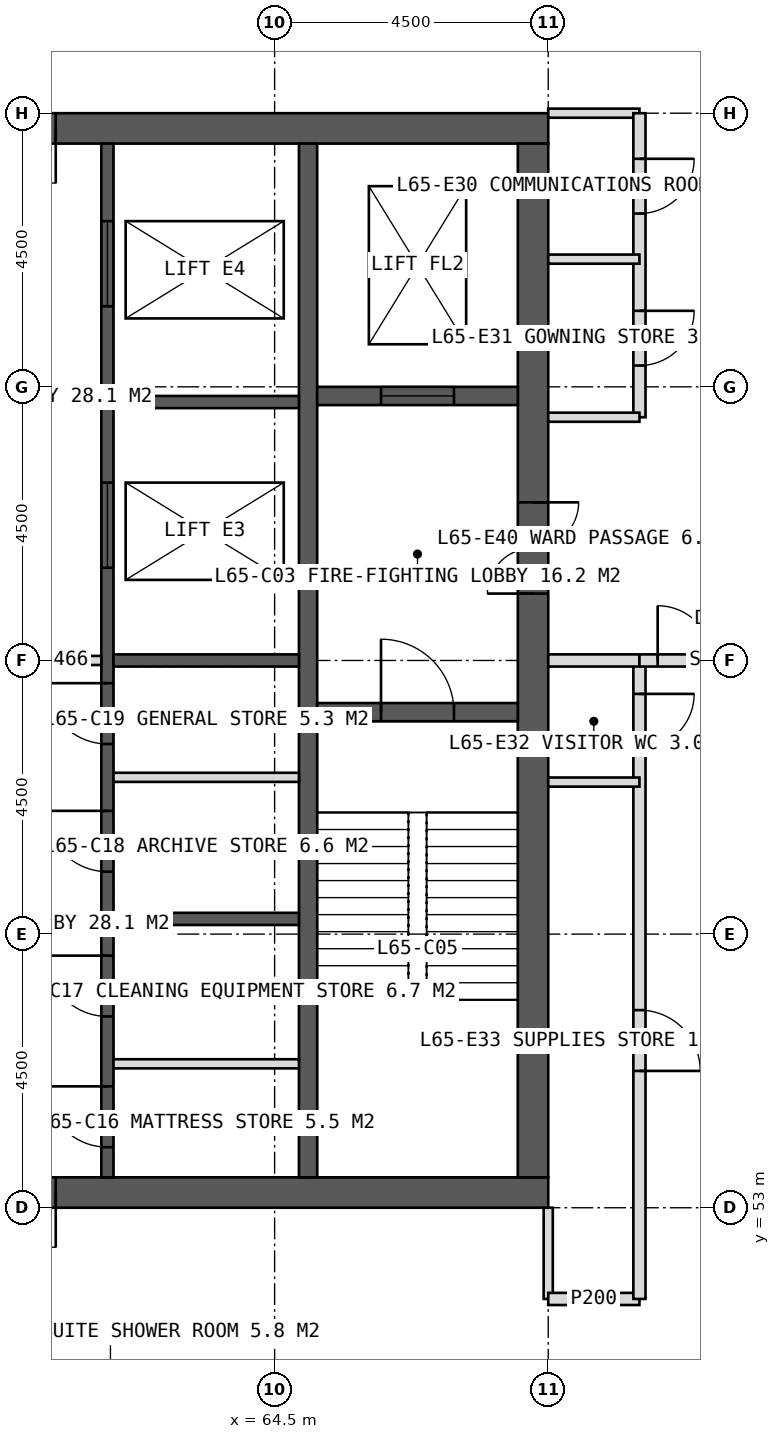
"""IFC4 building model, lengths in metres.
Left out: names, types, materials, properties, quantities, classifications, styles, units other than length and angle.
Written with IfcOpenShell. Run it as: python <this file> out.ifc"""

import sys

from ifc_helpers import new_model, si_unit, direction, frame, frame_2d, origin, place, context, subcontext, project, spatial, rectangle, extrude, element, fill, save


model = new_model("IFC4")
c1 = context("Model", 3, precision=1e-05, world=origin(), true_north=direction((0.0, 1.0)))
c2 = subcontext(c1, "Body", "Model", "MODEL_VIEW")
j1 = project(units=[si_unit("LENGTHUNIT", "METRE"), si_unit("PLANEANGLEUNIT", "RADIAN")], contexts=[c1])
p1 = place(None, origin())
s1 = spatial("IfcSite", under=j1, at=p1, CompositionType="ELEMENT")
p2 = place(p1, origin())
s2 = spatial("IfcBuilding", under=s1, at=p2, CompositionType="ELEMENT")
p3 = place(p2, frame((0.0, 0.0, 270.0)))
s3 = spatial("IfcBuildingStorey", under=s2, at=p3, CompositionType="ELEMENT", Elevation=270.0)
p4 = place(p3, frame((51.0, 70.75, 0.0), z_axis=(0.0, 0.0, 1.0), x_axis=(1.0, 0.0, 0.0)))
e1 = element("IfcWall", 1, at=p4, inside=s3, PredefinedType="SHEAR", context=c2, shape_type="SweptSolid", body=[
    extrude(rectangle(XDim=18.0, YDim=0.5, at=frame_2d((9.0, 0.0))), origin(), (0.0, 0.0, 1.0), 4.0),
])
p5 = place(p4, frame((8.1, 0.0, 0.0)))
e2 = element("IfcOpeningElement", 2, at=p5, cuts=e1, PredefinedType="OPENING", context=c2, shape_type="SweptSolid", body=[
    extrude(rectangle(XDim=1.8, YDim=2.2, at=frame_2d((0.9, 1.1))), frame((0.0, 0.26, 0.0), z_axis=(0.0, -1.0, 0.0), x_axis=(1.0, 0.0, 0.0)), (0.0, 0.0, 1.0), 0.52),
])
p6 = place(p3, frame((51.0, 53.25, 0.0), z_axis=(0.0, 0.0, 1.0), x_axis=(1.0, 0.0, 0.0)))
e3 = element("IfcWall", 3, at=p6, inside=s3, PredefinedType="SHEAR", context=c2, shape_type="SweptSolid", body=[
    extrude(rectangle(XDim=18.0, YDim=0.5, at=frame_2d((9.0, 0.0))), origin(), (0.0, 0.0, 1.0), 4.0),
])
p7 = place(p6, frame((8.1, 0.0, 0.0)))
e4 = element("IfcOpeningElement", 4, at=p7, cuts=e3, PredefinedType="OPENING", context=c2, shape_type="SweptSolid", body=[
    extrude(rectangle(XDim=1.8, YDim=2.2, at=frame_2d((0.9, 1.1))), frame((0.0, 0.26, 0.0), z_axis=(0.0, -1.0, 0.0), x_axis=(1.0, 0.0, 0.0)), (0.0, 0.0, 1.0), 0.52),
])
p8 = place(p3, frame((68.75, 53.5, 0.0), z_axis=(0.0, 0.0, 1.0), x_axis=(0.0, 1.0, 0.0)))
e5 = element("IfcWall", 5, at=p8, inside=s3, PredefinedType="SHEAR", context=c2, shape_type="SweptSolid", body=[
    extrude(rectangle(XDim=17.0, YDim=0.5, at=frame_2d((8.5, 0.0))), origin(), (0.0, 0.0, 1.0), 4.0),
])
p9 = place(p8, frame((9.6, 0.0, 0.0)))
e6 = element("IfcOpeningElement", 6, at=p9, cuts=e5, PredefinedType="OPENING", context=c2, shape_type="SweptSolid", body=[
    extrude(rectangle(XDim=1.5, YDim=2.2, at=frame_2d((0.75, 1.1))), frame((0.0, 0.26, 0.0), z_axis=(0.0, -1.0, 0.0), x_axis=(1.0, 0.0, 0.0)), (0.0, 0.0, 1.0), 0.52),
])
p10 = place(p3, frame((65.05, 53.5, 0.0), z_axis=(0.0, 0.0, 1.0), x_axis=(0.0, 1.0, 0.0)))
e7 = element("IfcWall", 7, at=p10, inside=s3, PredefinedType="SHEAR", context=c2, shape_type="SweptSolid", body=[
    extrude(rectangle(XDim=17.0, YDim=0.3, at=frame_2d((8.5, 0.0))), origin(), (0.0, 0.0, 1.0), 4.0),
])
p11 = place(p3, frame((61.75, 53.5, 0.0), z_axis=(0.0, 0.0, 1.0), x_axis=(0.0, 1.0, 0.0)))
e8 = element("IfcWall", 8, at=p11, inside=s3, PredefinedType="SHEAR", context=c2, shape_type="SweptSolid", body=[
    extrude(rectangle(XDim=17.0, YDim=0.2, at=frame_2d((8.5, 0.0))), origin(), (0.0, 0.0, 1.0), 4.0),
])
p12 = place(p11, frame((0.496, 0.0, 0.0)))
e9 = element("IfcOpeningElement", 9, at=p12, cuts=e8, PredefinedType="OPENING", context=c2, shape_type="SweptSolid", body=[
    extrude(rectangle(XDim=1.0, YDim=2.1, at=frame_2d((0.5, 1.05))), frame((0.0, 0.11, 0.0), z_axis=(0.0, -1.0, 0.0), x_axis=(1.0, 0.0, 0.0)), (0.0, 0.0, 1.0), 0.22),
])
p13 = place(p11, frame((2.646, 0.0, 0.0)))
e10 = element("IfcOpeningElement", 10, at=p13, cuts=e8, PredefinedType="OPENING", context=c2, shape_type="SweptSolid", body=[
    extrude(rectangle(XDim=1.0, YDim=2.1, at=frame_2d((0.5, 1.05))), frame((0.0, 0.11, 0.0), z_axis=(0.0, -1.0, 0.0), x_axis=(1.0, 0.0, 0.0)), (0.0, 0.0, 1.0), 0.22),
])
p14 = place(p11, frame((5.027, 0.0, 0.0)))
e11 = element("IfcOpeningElement", 11, at=p14, cuts=e8, PredefinedType="OPENING", context=c2, shape_type="SweptSolid", body=[
    extrude(rectangle(XDim=1.0, YDim=2.1, at=frame_2d((0.5, 1.05))), frame((0.0, 0.11, 0.0), z_axis=(0.0, -1.0, 0.0), x_axis=(1.0, 0.0, 0.0)), (0.0, 0.0, 1.0), 0.22),
])
p15 = place(p11, frame((7.126, 0.0, 0.0)))
e12 = element("IfcOpeningElement", 12, at=p15, cuts=e8, PredefinedType="OPENING", context=c2, shape_type="SweptSolid", body=[
    extrude(rectangle(XDim=1.0, YDim=2.1, at=frame_2d((0.5, 1.05))), frame((0.0, 0.11, 0.0), z_axis=(0.0, -1.0, 0.0), x_axis=(1.0, 0.0, 0.0)), (0.0, 0.0, 1.0), 0.22),
])
p16 = place(p11, frame((10.025, 0.0, 0.0)))
e13 = element("IfcOpeningElement", 13, at=p16, cuts=e8, PredefinedType="OPENING", context=c2, shape_type="SweptSolid", body=[
    extrude(rectangle(XDim=1.4, YDim=2.2, at=frame_2d((0.7, 1.1))), frame((0.0, 0.11, 0.0), z_axis=(0.0, -1.0, 0.0), x_axis=(1.0, 0.0, 0.0)), (0.0, 0.0, 1.0), 0.22),
])
p17 = place(p11, frame((14.325, 0.0, 0.0)))
e14 = element("IfcOpeningElement", 14, at=p17, cuts=e8, PredefinedType="OPENING", context=c2, shape_type="SweptSolid", body=[
    extrude(rectangle(XDim=1.4, YDim=2.2, at=frame_2d((0.7, 1.1))), frame((0.0, 0.11, 0.0), z_axis=(0.0, -1.0, 0.0), x_axis=(1.0, 0.0, 0.0)), (0.0, 0.0, 1.0), 0.22),
])
for number, where, z_axis, x_axis in (
    (15, (61.85, 57.75, 0.0), (0.0, 0.0, 1.0), (1.0, 0.0, 0.0)),
    (16, (61.85, 62.0, 0.0), (0.0, 0.0, 1.0), (1.0, 0.0, 0.0)),
    (17, (61.85, 66.25, 0.0), (0.0, 0.0, 1.0), (1.0, 0.0, 0.0)),
):
    element("IfcWall", number, at=place(p3, frame(where, z_axis=z_axis, x_axis=x_axis)), inside=s3, PredefinedType="SHEAR", context=c2, shape_type="SweptSolid", body=[
        extrude(rectangle(XDim=3.05, YDim=0.2, at=frame_2d((1.525, 0.0))), origin(), (0.0, 0.0, 1.0), 4.0),
    ])
p18 = place(p3, frame((65.2, 61.15, 0.0), z_axis=(0.0, 0.0, 1.0), x_axis=(1.0, 0.0, 0.0)))
e18 = element("IfcWall", 18, at=p18, inside=s3, PredefinedType="SHEAR", context=c2, shape_type="SweptSolid", body=[
    extrude(rectangle(XDim=3.3, YDim=0.3, at=frame_2d((1.65, 0.0))), origin(), (0.0, 0.0, 1.0), 4.0),
])
p19 = place(p18, frame((1.05, 0.0, 0.0)))
e19 = element("IfcOpeningElement", 19, at=p19, cuts=e18, PredefinedType="OPENING", context=c2, shape_type="SweptSolid", body=[
    extrude(rectangle(XDim=1.2, YDim=2.1, at=frame_2d((0.6, 1.05))), frame((0.0, 0.16, 0.0), z_axis=(0.0, -1.0, 0.0), x_axis=(1.0, 0.0, 0.0)), (0.0, 0.0, 1.0), 0.32),
])
p20 = place(p3, frame((65.2, 66.35, 0.0), z_axis=(0.0, 0.0, 1.0), x_axis=(1.0, 0.0, 0.0)))
e20 = element("IfcWall", 20, at=p20, inside=s3, PredefinedType="SHEAR", context=c2, shape_type="SweptSolid", body=[
    extrude(rectangle(XDim=3.3, YDim=0.3, at=frame_2d((1.65, 0.0))), origin(), (0.0, 0.0, 1.0), 4.0),
])
p21 = place(p20, frame((1.05, 0.0, 0.0)))
e21 = element("IfcOpeningElement", 21, at=p21, cuts=e20, PredefinedType="OPENING", context=c2, shape_type="SweptSolid", body=[
    extrude(rectangle(XDim=1.2, YDim=2.2, at=frame_2d((0.6, 1.1))), frame((0.0, 0.16, 0.0), z_axis=(0.0, -1.0, 0.0), x_axis=(1.0, 0.0, 0.0)), (0.0, 0.0, 1.0), 0.32),
])
p22 = place(p3, frame((69.0, 53.0, 0.0), z_axis=(0.0, 0.0, 1.0), x_axis=(0.0, -1.0, 0.0)))
e22 = element("IfcWall", 22, at=p22, inside=s3, PredefinedType="PARTITIONING", context=c2, shape_type="SweptSolid", body=[
    extrude(rectangle(XDim=1.5, YDim=0.15, at=frame_2d((0.75, 0.0))), origin(), (0.0, 0.0, 1.0), 3.75),
])
p23 = place(p3, frame((70.5, 51.5, 0.0), z_axis=(0.0, 0.0, 1.0), x_axis=(-1.0, 0.0, 0.0)))
e23 = element("IfcWall", 23, at=p23, inside=s3, PredefinedType="PARTITIONING", context=c2, shape_type="SweptSolid", body=[
    extrude(rectangle(XDim=1.5, YDim=0.2, at=frame_2d((0.75, 0.0))), origin(), (0.0, 0.0, 1.0), 3.75),
])
p24 = place(p3, frame((69.0, 71.0, 0.0), z_axis=(0.0, 0.0, 1.0), x_axis=(1.0, 0.0, 0.0)))
e24 = element("IfcWall", 24, at=p24, inside=s3, PredefinedType="PARTITIONING", context=c2, shape_type="SweptSolid", body=[
    extrude(rectangle(XDim=1.5, YDim=0.15, at=frame_2d((0.75, 0.0))), origin(), (0.0, 0.0, 1.0), 3.75),
])
p25 = place(p3, frame((70.5, 71.0, 0.0), z_axis=(0.0, 0.0, 1.0), x_axis=(0.0, -1.0, 0.0)))
e25 = element("IfcWall", 25, at=p25, inside=s3, PredefinedType="PARTITIONING", context=c2, shape_type="SweptSolid", body=[
    extrude(rectangle(XDim=5.0, YDim=0.2, at=frame_2d((2.5, 0.0))), origin(), (0.0, 0.0, 1.0), 3.75),
])
p26 = place(p25, frame((0.75, 0.0, 0.0)))
e26 = element("IfcOpeningElement", 26, at=p26, cuts=e25, PredefinedType="OPENING", context=c2, shape_type="SweptSolid", body=[
    extrude(rectangle(XDim=0.9, YDim=2.1, at=frame_2d((0.45, 1.05))), frame((0.0, 0.11, 0.0), z_axis=(0.0, -1.0, 0.0), x_axis=(1.0, 0.0, 0.0)), (0.0, 0.0, 1.0), 0.22),
])
p27 = place(p25, frame((3.25, 0.0, 0.0)))
e27 = element("IfcOpeningElement", 27, at=p27, cuts=e25, PredefinedType="OPENING", context=c2, shape_type="SweptSolid", body=[
    extrude(rectangle(XDim=0.9, YDim=2.1, at=frame_2d((0.45, 1.05))), frame((0.0, 0.11, 0.0), z_axis=(0.0, -1.0, 0.0), x_axis=(1.0, 0.0, 0.0)), (0.0, 0.0, 1.0), 0.22),
])
p28 = place(p3, frame((70.5, 62.0, 0.0), z_axis=(0.0, 0.0, 1.0), x_axis=(0.0, -1.0, 0.0)))
e28 = element("IfcWall", 28, at=p28, inside=s3, PredefinedType="PARTITIONING", context=c2, shape_type="SweptSolid", body=[
    extrude(rectangle(XDim=10.5, YDim=0.2, at=frame_2d((5.25, 0.0))), origin(), (0.0, 0.0, 1.0), 3.75),
])
p29 = place(p28, frame((0.55, 0.0, 0.0)))
e29 = element("IfcOpeningElement", 29, at=p29, cuts=e28, PredefinedType="OPENING", context=c2, shape_type="SweptSolid", body=[
    extrude(rectangle(XDim=0.9, YDim=2.1, at=frame_2d((0.45, 1.05))), frame((0.0, 0.11, 0.0), z_axis=(0.0, -1.0, 0.0), x_axis=(1.0, 0.0, 0.0)), (0.0, 0.0, 1.0), 0.22),
])
p30 = place(p28, frame((5.75, 0.0, 0.0)))
e30 = element("IfcOpeningElement", 30, at=p30, cuts=e28, PredefinedType="OPENING", context=c2, shape_type="SweptSolid", body=[
    extrude(rectangle(XDim=1.0, YDim=2.1, at=frame_2d((0.5, 1.05))), frame((0.0, 0.11, 0.0), z_axis=(0.0, -1.0, 0.0), x_axis=(1.0, 0.0, 0.0)), (0.0, 0.0, 1.0), 0.22),
])
p31 = place(p3, frame((69.0, 66.0, 0.0), z_axis=(0.0, 0.0, 1.0), x_axis=(1.0, 0.0, 0.0)))
e31 = element("IfcWall", 31, at=p31, inside=s3, PredefinedType="PARTITIONING", context=c2, shape_type="SweptSolid", body=[
    extrude(rectangle(XDim=1.5, YDim=0.15, at=frame_2d((0.75, 0.0))), origin(), (0.0, 0.0, 1.0), 3.75),
])
p32 = place(p3, frame((69.0, 62.0, 0.0), z_axis=(0.0, 0.0, 1.0), x_axis=(1.0, 0.0, 0.0)))
e32 = element("IfcWall", 32, at=p32, inside=s3, PredefinedType="SOLIDWALL", context=c2, shape_type="SweptSolid", body=[
    extrude(rectangle(XDim=1.5, YDim=0.2, at=frame_2d((0.75, 0.0))), origin(), (0.0, 0.0, 1.0), 2.75),
])
for number, where, z_axis, x_axis in (
    (33, (69.0, 68.6, 0.0), (0.0, 0.0, 1.0), (1.0, 0.0, 0.0)),
    (34, (69.0, 60.0, 0.0), (0.0, 0.0, 1.0), (1.0, 0.0, 0.0)),
):
    element("IfcWall", number, at=place(p3, frame(where, z_axis=z_axis, x_axis=x_axis)), inside=s3, PredefinedType="PARTITIONING", context=c2, shape_type="SweptSolid", body=[
        extrude(rectangle(XDim=1.5, YDim=0.15, at=frame_2d((0.75, 0.0))), origin(), (0.0, 0.0, 1.0), 3.75),
    ])
p33 = place(p3, frame((70.5, 62.0, 0.0), z_axis=(0.0, 0.0, 1.0), x_axis=(1.0, 0.0, 0.0)))
e35 = element("IfcWall", 35, at=p33, inside=s3, PredefinedType="SOLIDWALL", context=c2, shape_type="SweptSolid", body=[
    extrude(rectangle(XDim=2.6, YDim=0.2, at=frame_2d((1.3, 0.0))), origin(), (0.0, 0.0, 1.0), 2.75),
])
p34 = place(p33, frame((0.3, 0.0, 0.0)))
e36 = element("IfcOpeningElement", 36, at=p34, cuts=e35, PredefinedType="OPENING", context=c2, shape_type="SweptSolid", body=[
    extrude(rectangle(XDim=1.8, YDim=2.2, at=frame_2d((0.9, 1.1))), frame((0.0, 0.11, 0.0), z_axis=(0.0, -1.0, 0.0), x_axis=(1.0, 0.0, 0.0)), (0.0, 0.0, 1.0), 0.22),
])
for number, where, z_axis, x_axis in (
    (37, (61.85, 55.367, 0.0), (0.0, 0.0, 1.0), (1.0, 0.0, 0.0)),
    (38, (61.85, 60.078, 0.0), (0.0, 0.0, 1.0), (1.0, 0.0, 0.0)),
):
    element("IfcWall", number, at=place(p3, frame(where, z_axis=z_axis, x_axis=x_axis)), inside=s3, PredefinedType="PARTITIONING", context=c2, shape_type="SweptSolid", body=[
        extrude(rectangle(XDim=3.05, YDim=0.15, at=frame_2d((1.525, 0.0))), origin(), (0.0, 0.0, 1.0), 3.75),
    ])
p35 = place(p3, frame((58.35, 62.0, 0.0), z_axis=(0.0, 0.0, 1.0), x_axis=(1.0, 0.0, 0.0)))
e39 = element("IfcWall", 39, at=p35, inside=s3, PredefinedType="PARTITIONING", context=c2, shape_type="SweptSolid", body=[
    extrude(rectangle(XDim=3.3, YDim=0.15, at=frame_2d((1.65, 0.0))), origin(), (0.0, 0.0, 1.0), 3.75),
])
p36 = place(p26, origin())
e40 = element("IfcDoor", 40, at=p36, inside=s3, OperationType="SINGLE_SWING_LEFT", PredefinedType="DOOR", context=c2, shape_type="SweptSolid", body=[
    extrude(rectangle(XDim=0.9, YDim=2.1, at=frame_2d((0.45, 1.05))), frame((0.0, 0.025, 0.0), z_axis=(0.0, -1.0, 0.0), x_axis=(1.0, 0.0, 0.0)), (0.0, 0.0, 1.0), 0.05),
])
fill(e26, e40)
p37 = place(p27, origin())
e41 = element("IfcDoor", 41, at=p37, inside=s3, OperationType="SINGLE_SWING_LEFT", PredefinedType="DOOR", context=c2, shape_type="SweptSolid", body=[
    extrude(rectangle(XDim=0.9, YDim=2.1, at=frame_2d((0.45, 1.05))), frame((0.0, 0.025, 0.0), z_axis=(0.0, -1.0, 0.0), x_axis=(1.0, 0.0, 0.0)), (0.0, 0.0, 1.0), 0.05),
])
fill(e27, e41)
p38 = place(p29, origin())
e42 = element("IfcDoor", 42, at=p38, inside=s3, OperationType="SINGLE_SWING_LEFT", PredefinedType="DOOR", context=c2, shape_type="SweptSolid", body=[
    extrude(rectangle(XDim=0.9, YDim=2.1, at=frame_2d((0.45, 1.05))), frame((0.0, 0.025, 0.0), z_axis=(0.0, -1.0, 0.0), x_axis=(1.0, 0.0, 0.0)), (0.0, 0.0, 1.0), 0.05),
])
fill(e29, e42)
p39 = place(p30, origin())
e43 = element("IfcDoor", 43, at=p39, inside=s3, OperationType="SINGLE_SWING_RIGHT", PredefinedType="DOOR", context=c2, shape_type="SweptSolid", body=[
    extrude(rectangle(XDim=1.0, YDim=2.1, at=frame_2d((0.5, 1.05))), frame((0.0, 0.025, 0.0), z_axis=(0.0, -1.0, 0.0), x_axis=(1.0, 0.0, 0.0)), (0.0, 0.0, 1.0), 0.05),
])
fill(e30, e43)
p40 = place(p34, origin())
e44 = element("IfcDoor", 44, at=p40, inside=s3, OperationType="DOUBLE_DOOR_DOUBLE_SWING", PredefinedType="DOOR", context=c2, shape_type="SweptSolid", body=[
    extrude(rectangle(XDim=1.8, YDim=2.2, at=frame_2d((0.9, 1.1))), frame((0.0, 0.025, 0.0), z_axis=(0.0, -1.0, 0.0), x_axis=(1.0, 0.0, 0.0)), (0.0, 0.0, 1.0), 0.05),
])
fill(e36, e44)
p41 = place(p5, origin())
e45 = element("IfcDoor", 45, at=p41, inside=s3, OperationType="DOUBLE_DOOR_SINGLE_SWING", PredefinedType="DOOR", context=c2, shape_type="SweptSolid", body=[
    extrude(rectangle(XDim=1.8, YDim=2.2, at=frame_2d((0.9, 1.1))), frame((0.0, 0.025, 0.0), z_axis=(0.0, -1.0, 0.0), x_axis=(1.0, 0.0, 0.0)), (0.0, 0.0, 1.0), 0.05),
])
fill(e2, e45)
p42 = place(p9, origin())
e46 = element("IfcDoor", 46, at=p42, inside=s3, OperationType="DOUBLE_DOOR_SINGLE_SWING", PredefinedType="DOOR", context=c2, shape_type="SweptSolid", body=[
    extrude(rectangle(XDim=1.5, YDim=2.2, at=frame_2d((0.75, 1.1))), frame((0.0, 0.025, 0.0), z_axis=(0.0, -1.0, 0.0), x_axis=(1.0, 0.0, 0.0)), (0.0, 0.0, 1.0), 0.05),
])
fill(e6, e46)
p43 = place(p19, origin())
e47 = element("IfcDoor", 47, at=p43, inside=s3, OperationType="SINGLE_SWING_LEFT", PredefinedType="DOOR", context=c2, shape_type="SweptSolid", body=[
    extrude(rectangle(XDim=1.2, YDim=2.1, at=frame_2d((0.6, 1.05))), frame((0.0, 0.025, 0.0), z_axis=(0.0, -1.0, 0.0), x_axis=(1.0, 0.0, 0.0)), (0.0, 0.0, 1.0), 0.05),
])
fill(e19, e47)
p44 = place(p21, origin())
e48 = element("IfcDoor", 48, at=p44, inside=s3, OperationType="SLIDING_TO_LEFT", PredefinedType="DOOR", context=c2, shape_type="SweptSolid", body=[
    extrude(rectangle(XDim=1.2, YDim=2.2, at=frame_2d((0.6, 1.1))), frame((0.0, 0.025, 0.0), z_axis=(0.0, -1.0, 0.0), x_axis=(1.0, 0.0, 0.0)), (0.0, 0.0, 1.0), 0.05),
])
fill(e21, e48)
p45 = place(p12, origin())
e49 = element("IfcDoor", 49, at=p45, inside=s3, OperationType="SINGLE_SWING_RIGHT", PredefinedType="DOOR", context=c2, shape_type="SweptSolid", body=[
    extrude(rectangle(XDim=1.0, YDim=2.1, at=frame_2d((0.5, 1.05))), frame((0.0, 0.025, 0.0), z_axis=(0.0, -1.0, 0.0), x_axis=(1.0, 0.0, 0.0)), (0.0, 0.0, 1.0), 0.05),
])
fill(e9, e49)
p46 = place(p13, origin())
e50 = element("IfcDoor", 50, at=p46, inside=s3, OperationType="SINGLE_SWING_RIGHT", PredefinedType="DOOR", context=c2, shape_type="SweptSolid", body=[
    extrude(rectangle(XDim=1.0, YDim=2.1, at=frame_2d((0.5, 1.05))), frame((0.0, 0.025, 0.0), z_axis=(0.0, -1.0, 0.0), x_axis=(1.0, 0.0, 0.0)), (0.0, 0.0, 1.0), 0.05),
])
fill(e10, e50)
p47 = place(p14, origin())
e51 = element("IfcDoor", 51, at=p47, inside=s3, OperationType="SINGLE_SWING_RIGHT", PredefinedType="DOOR", context=c2, shape_type="SweptSolid", body=[
    extrude(rectangle(XDim=1.0, YDim=2.1, at=frame_2d((0.5, 1.05))), frame((0.0, 0.025, 0.0), z_axis=(0.0, -1.0, 0.0), x_axis=(1.0, 0.0, 0.0)), (0.0, 0.0, 1.0), 0.05),
])
fill(e11, e51)
p48 = place(p15, origin())
e52 = element("IfcDoor", 52, at=p48, inside=s3, OperationType="SINGLE_SWING_RIGHT", PredefinedType="DOOR", context=c2, shape_type="SweptSolid", body=[
    extrude(rectangle(XDim=1.0, YDim=2.1, at=frame_2d((0.5, 1.05))), frame((0.0, 0.025, 0.0), z_axis=(0.0, -1.0, 0.0), x_axis=(1.0, 0.0, 0.0)), (0.0, 0.0, 1.0), 0.05),
])
fill(e12, e52)
p49 = place(p16, origin())
e53 = element("IfcDoor", 53, at=p49, inside=s3, OperationType="SLIDING_TO_LEFT", PredefinedType="DOOR", context=c2, shape_type="SweptSolid", body=[
    extrude(rectangle(XDim=1.4, YDim=2.2, at=frame_2d((0.7, 1.1))), frame((0.0, 0.025, 0.0), z_axis=(0.0, -1.0, 0.0), x_axis=(1.0, 0.0, 0.0)), (0.0, 0.0, 1.0), 0.05),
])
fill(e13, e53)
p50 = place(p17, origin())
e54 = element("IfcDoor", 54, at=p50, inside=s3, OperationType="SLIDING_TO_LEFT", PredefinedType="DOOR", context=c2, shape_type="SweptSolid", body=[
    extrude(rectangle(XDim=1.4, YDim=2.2, at=frame_2d((0.7, 1.1))), frame((0.0, 0.025, 0.0), z_axis=(0.0, -1.0, 0.0), x_axis=(1.0, 0.0, 0.0)), (0.0, 0.0, 1.0), 0.05),
])
fill(e14, e54)
p51 = place(p7, origin())
e55 = element("IfcDoor", 55, at=p51, inside=s3, OperationType="DOUBLE_DOOR_SINGLE_SWING", PredefinedType="DOOR", context=c2, shape_type="SweptSolid", body=[
    extrude(rectangle(XDim=1.8, YDim=2.2, at=frame_2d((0.9, 1.1))), frame((0.0, 0.025, 0.0), z_axis=(0.0, -1.0, 0.0), x_axis=(1.0, 0.0, 0.0)), (0.0, 0.0, 1.0), 0.05),
])
fill(e4, e55)
save(model, sys.argv[1])
